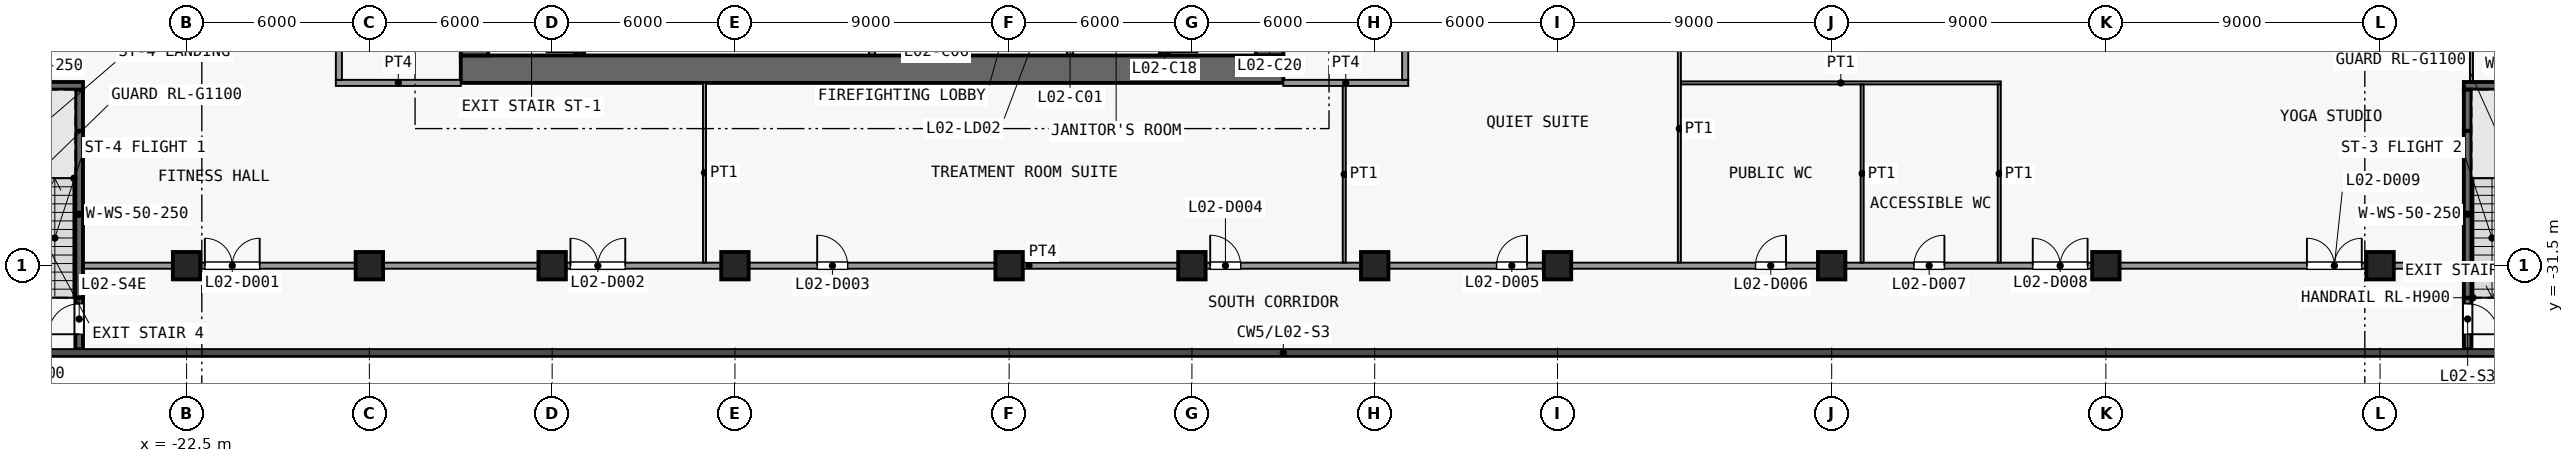
"""IFC4 building model, lengths in metres.
Left out: names, types, materials, properties, quantities, classifications, styles, units other than length and angle.
Written with IfcOpenShell. Run it as: python <this file> out.ifc"""

import sys

from ifc_helpers import new_model, si_unit, direction, frame, frame_2d, origin, origin_2d, place, context, subcontext, project, spatial, rectangle, extrude, element, fill, save


model = new_model("IFC4")
c1 = context("Model", 3, precision=1e-05, world=origin(), true_north=direction((0.0, 1.0)))
c2 = subcontext(c1, "Body", "Model", "MODEL_VIEW")
j1 = project(units=[si_unit("LENGTHUNIT", "METRE"), si_unit("PLANEANGLEUNIT", "RADIAN")], contexts=[c1])
p1 = place(None, origin())
s1 = spatial("IfcSite", under=j1, at=p1, CompositionType="ELEMENT")
p2 = place(p1, origin())
s2 = spatial("IfcBuilding", under=s1, at=p2, CompositionType="ELEMENT")
p3 = place(p2, frame((0.0, 0.0, 13.5)))
s3 = spatial("IfcBuildingStorey", under=s2, at=p3, CompositionType="ELEMENT", Elevation=13.5)
for number, where, z_axis, x_axis in (
    (1, (-22.5, -31.5, 0.0), (0.0, 0.0, 1.0), (1.0, 0.0, 0.0)),
    (2, (-16.5, -31.5, 0.0), (0.0, 0.0, 1.0), (1.0, 0.0, 0.0)),
    (3, (-10.5, -31.5, 0.0), (0.0, 0.0, 1.0), (1.0, 0.0, 0.0)),
    (4, (-4.5, -31.5, 0.0), (0.0, 0.0, 1.0), (1.0, 0.0, 0.0)),
    (5, (4.5, -31.5, 0.0), (0.0, 0.0, 1.0), (1.0, 0.0, 0.0)),
    (6, (10.5, -31.5, 0.0), (0.0, 0.0, 1.0), (1.0, 0.0, 0.0)),
    (7, (16.5, -31.5, 0.0), (0.0, 0.0, 1.0), (1.0, 0.0, 0.0)),
    (8, (22.5, -31.5, 0.0), (0.0, 0.0, 1.0), (1.0, 0.0, 0.0)),
    (9, (31.5, -31.5, 0.0), (0.0, 0.0, 1.0), (1.0, 0.0, 0.0)),
    (10, (40.5, -31.5, 0.0), (0.0, 0.0, 1.0), (1.0, 0.0, 0.0)),
    (11, (49.5, -31.5, 0.0), (0.0, 0.0, 1.0), (1.0, 0.0, 0.0)),
):
    element("IfcColumn", number, at=place(p3, frame(where, z_axis=z_axis, x_axis=x_axis)), inside=s3, PredefinedType="COLUMN", context=c2, shape_type="SweptSolid", body=[
        extrude(rectangle(XDim=0.9, YDim=0.9, at=origin_2d()), origin(), (0.0, 0.0, 1.0), 5.0),
    ])
p4 = place(p3, frame((-13.5, -25.05, 0.0), z_axis=(0.0, 0.0, 1.0), x_axis=(1.0, 0.0, 0.0)))
e12 = element("IfcWall", 12, at=p4, inside=s3, PredefinedType="SHEAR", context=c2, shape_type="SweptSolid", body=[
    extrude(rectangle(XDim=27.0, YDim=0.9, at=frame_2d((13.5, 0.0))), origin(), (0.0, 0.0, 1.0), 4.65),
])
p5 = place(p3, frame((-13.05, -8.5, 0.0), z_axis=(0.0, 0.0, 1.0), x_axis=(0.0, -1.0, 0.0)))
e13 = element("IfcWall", 13, at=p5, inside=s3, PredefinedType="SHEAR", context=c2, shape_type="SweptSolid", body=[
    extrude(rectangle(XDim=16.1, YDim=0.9, at=frame_2d((8.05, 0.0))), origin(), (0.0, 0.0, 1.0), 4.65),
])
p6 = place(p5, frame((14.8, 0.0, 0.0)))
e14 = element("IfcOpeningElement", 14, at=p6, cuts=e13, PredefinedType="OPENING", context=c2, shape_type="SweptSolid", body=[
    extrude(rectangle(XDim=1.1, YDim=2.1, at=frame_2d((0.55, 1.05))), frame((0.0, 0.46, 0.0), z_axis=(0.0, -1.0, 0.0), x_axis=(1.0, 0.0, 0.0)), (0.0, 0.0, 1.0), 0.92),
])
p7 = place(p3, frame((13.05, -24.6, 0.0), z_axis=(0.0, 0.0, 1.0), x_axis=(0.0, 1.0, 0.0)))
e15 = element("IfcWall", 15, at=p7, inside=s3, PredefinedType="SHEAR", context=c2, shape_type="SweptSolid", body=[
    extrude(rectangle(XDim=16.1, YDim=0.9, at=frame_2d((8.05, 0.0))), origin(), (0.0, 0.0, 1.0), 4.65),
])
p8 = place(p7, frame((0.2, 0.0, 0.0)))
e16 = element("IfcOpeningElement", 16, at=p8, cuts=e15, PredefinedType="OPENING", context=c2, shape_type="SweptSolid", body=[
    extrude(rectangle(XDim=1.1, YDim=2.1, at=frame_2d((0.55, 1.05))), frame((0.0, 0.46, 0.0), z_axis=(0.0, -1.0, 0.0), x_axis=(1.0, 0.0, 0.0)), (0.0, 0.0, 1.0), 0.92),
])
p9 = place(p3, frame((-9.6, -24.6, 0.0), z_axis=(0.0, 0.0, 1.0), x_axis=(0.0, 1.0, 0.0)))
e17 = element("IfcWall", 17, at=p9, inside=s3, PredefinedType="SHEAR", context=c2, shape_type="SweptSolid", body=[
    extrude(rectangle(XDim=7.7, YDim=0.3, at=frame_2d((3.85, 0.0))), origin(), (0.0, 0.0, 1.0), 4.65),
])
p10 = place(p9, frame((0.1, 0.0, 0.0)))
e18 = element("IfcOpeningElement", 18, at=p10, cuts=e17, PredefinedType="OPENING", context=c2, shape_type="SweptSolid", body=[
    extrude(rectangle(XDim=1.1, YDim=2.1, at=frame_2d((0.55, 1.05))), frame((0.0, 0.16, 0.0), z_axis=(0.0, -1.0, 0.0), x_axis=(1.0, 0.0, 0.0)), (0.0, 0.0, 1.0), 0.32),
])
p11 = place(p3, frame((0.0, -24.6, 0.0), z_axis=(0.0, 0.0, 1.0), x_axis=(0.0, 1.0, 0.0)))
e19 = element("IfcWall", 19, at=p11, inside=s3, PredefinedType="PARTITIONING", context=c2, shape_type="SweptSolid", body=[
    extrude(rectangle(XDim=2.05, YDim=0.2, at=frame_2d((1.025, 0.0))), origin(), (0.0, 0.0, 1.0), 4.65),
])
p12 = place(p3, frame((3.1, -24.6, 0.0), z_axis=(0.0, 0.0, 1.0), x_axis=(0.0, 1.0, 0.0)))
e20 = element("IfcWall", 20, at=p12, inside=s3, PredefinedType="PARTITIONING", context=c2, shape_type="SweptSolid", body=[
    extrude(rectangle(XDim=2.05, YDim=0.2, at=frame_2d((1.025, 0.0))), origin(), (0.0, 0.0, 1.0), 4.65),
])
p13 = place(p12, frame((0.65, 0.0, 0.0)))
e21 = element("IfcOpeningElement", 21, at=p13, cuts=e20, PredefinedType="OPENING", context=c2, shape_type="SweptSolid", body=[
    extrude(rectangle(XDim=0.9, YDim=2.1, at=frame_2d((0.45, 1.05))), frame((0.0, 0.11, 0.0), z_axis=(0.0, -1.0, 0.0), x_axis=(1.0, 0.0, 0.0)), (0.0, 0.0, 1.0), 0.22),
])
p14 = place(p3, frame((6.5, -22.55, 0.0), z_axis=(0.0, 0.0, 1.0), x_axis=(0.0, -1.0, 0.0)))
e22 = element("IfcWall", 22, at=p14, inside=s3, PredefinedType="PARTITIONING", context=c2, shape_type="SweptSolid", body=[
    extrude(rectangle(XDim=2.05, YDim=0.2, at=frame_2d((1.025, 0.0))), origin(), (0.0, 0.0, 1.0), 4.65),
])
p15 = place(p14, frame((0.35, 0.0, 0.0)))
e23 = element("IfcOpeningElement", 23, at=p15, cuts=e22, PredefinedType="OPENING", context=c2, shape_type="SweptSolid", body=[
    extrude(rectangle(XDim=1.2, YDim=2.1, at=frame_2d((0.6, 1.05))), frame((0.0, 0.11, 0.0), z_axis=(0.0, -1.0, 0.0), x_axis=(1.0, 0.0, 0.0)), (0.0, 0.0, 1.0), 0.22),
])
p16 = place(p3, frame((9.6, -16.9, 0.0), z_axis=(0.0, 0.0, 1.0), x_axis=(0.0, -1.0, 0.0)))
e24 = element("IfcWall", 24, at=p16, inside=s3, PredefinedType="SHEAR", context=c2, shape_type="SweptSolid", body=[
    extrude(rectangle(XDim=7.7, YDim=0.3, at=frame_2d((3.85, 0.0))), origin(), (0.0, 0.0, 1.0), 4.65),
])
p17 = place(p16, frame((6.5, 0.0, 0.0)))
e25 = element("IfcOpeningElement", 25, at=p17, cuts=e24, PredefinedType="OPENING", context=c2, shape_type="SweptSolid", body=[
    extrude(rectangle(XDim=1.1, YDim=2.1, at=frame_2d((0.55, 1.05))), frame((0.0, 0.16, 0.0), z_axis=(0.0, -1.0, 0.0), x_axis=(1.0, 0.0, 0.0)), (0.0, 0.0, 1.0), 0.32),
])
p18 = place(p3, frame((52.375, -32.55, 0.0), z_axis=(0.0, 0.0, 1.0), x_axis=(0.0, -1.0, 0.0)))
e26 = element("IfcWall", 26, at=p18, inside=s3, PredefinedType="SHEAR", context=c2, shape_type="SweptSolid", body=[
    extrude(rectangle(XDim=1.69, YDim=0.25, at=frame_2d((0.845, 0.0))), origin(), (0.0, 0.0, 1.0), 4.65),
])
p19 = place(p18, frame((0.2, 0.0, 0.0)))
e27 = element("IfcOpeningElement", 27, at=p19, cuts=e26, PredefinedType="OPENING", context=c2, shape_type="SweptSolid", body=[
    extrude(rectangle(XDim=1.0, YDim=2.1, at=frame_2d((0.5, 1.05))), frame((0.0, 0.135, 0.0), z_axis=(0.0, -1.0, 0.0), x_axis=(1.0, 0.0, 0.0)), (0.0, 0.0, 1.0), 0.27),
])
p20 = place(p3, frame((52.375, -32.55, 0.0), z_axis=(0.0, 0.0, 1.0), x_axis=(0.0, 1.0, 0.0)))
e28 = element("IfcWall", 28, at=p20, inside=s3, PredefinedType="SHEAR", context=c2, shape_type="SweptSolid", body=[
    extrude(rectangle(XDim=5.48, YDim=0.25, at=frame_2d((2.74, 0.0))), origin(), (0.0, 0.0, 1.0), 4.65),
])
p21 = place(p3, frame((52.375, -27.07, 0.0), z_axis=(0.0, 0.0, 1.0), x_axis=(0.0, 1.0, 0.0)))
e29 = element("IfcWall", 29, at=p21, inside=s3, PredefinedType="SHEAR", context=c2, shape_type="SweptSolid", body=[
    extrude(rectangle(XDim=1.35, YDim=0.25, at=frame_2d((0.675, 0.0))), origin(), (0.0, 0.0, 1.0), 4.65),
])
p22 = place(p3, frame((52.25, -25.595, 0.0), z_axis=(0.0, 0.0, 1.0), x_axis=(1.0, 0.0, 0.0)))
e30 = element("IfcWall", 30, at=p22, inside=s3, PredefinedType="SHEAR", context=c2, shape_type="SweptSolid", body=[
    extrude(rectangle(XDim=3.35, YDim=0.25, at=frame_2d((1.675, 0.0))), origin(), (0.0, 0.0, 1.0), 4.65),
])
p23 = place(p3, frame((-26.025, -34.24, 0.0), z_axis=(0.0, 0.0, 1.0), x_axis=(0.0, 1.0, 0.0)))
e31 = element("IfcWall", 31, at=p23, inside=s3, PredefinedType="SHEAR", context=c2, shape_type="SweptSolid", body=[
    extrude(rectangle(XDim=1.69, YDim=0.25, at=frame_2d((0.845, 0.0))), origin(), (0.0, 0.0, 1.0), 4.65),
])
p24 = place(p23, frame((0.49, 0.0, 0.0)))
e32 = element("IfcOpeningElement", 32, at=p24, cuts=e31, PredefinedType="OPENING", context=c2, shape_type="SweptSolid", body=[
    extrude(rectangle(XDim=1.0, YDim=2.1, at=frame_2d((0.5, 1.05))), frame((0.0, 0.135, 0.0), z_axis=(0.0, -1.0, 0.0), x_axis=(1.0, 0.0, 0.0)), (0.0, 0.0, 1.0), 0.27),
])
p25 = place(p3, frame((-26.025, -32.55, 0.0), z_axis=(0.0, 0.0, 1.0), x_axis=(0.0, 1.0, 0.0)))
e33 = element("IfcWall", 33, at=p25, inside=s3, PredefinedType="SHEAR", context=c2, shape_type="SweptSolid", body=[
    extrude(rectangle(XDim=5.48, YDim=0.25, at=frame_2d((2.74, 0.0))), origin(), (0.0, 0.0, 1.0), 4.65),
])
p26 = place(p3, frame((-26.025, -27.07, 0.0), z_axis=(0.0, 0.0, 1.0), x_axis=(0.0, 1.0, 0.0)))
e34 = element("IfcWall", 34, at=p26, inside=s3, PredefinedType="SHEAR", context=c2, shape_type="SweptSolid", body=[
    extrude(rectangle(XDim=1.35, YDim=0.25, at=frame_2d((0.675, 0.0))), origin(), (0.0, 0.0, 1.0), 4.65),
])
p27 = place(p3, frame((-29.25, -25.595, 0.0), z_axis=(0.0, 0.0, 1.0), x_axis=(1.0, 0.0, 0.0)))
e35 = element("IfcWall", 35, at=p27, inside=s3, PredefinedType="SHEAR", context=c2, shape_type="SweptSolid", body=[
    extrude(rectangle(XDim=3.35, YDim=0.25, at=frame_2d((1.675, 0.0))), origin(), (0.0, 0.0, 1.0), 4.65),
])
p28 = place(p3, frame((-25.9, -31.5, 0.0), z_axis=(0.0, 0.0, 1.0), x_axis=(1.0, 0.0, 0.0)))
e36 = element("IfcWall", 36, at=p28, inside=s3, PredefinedType="PARTITIONING", context=c2, shape_type="SweptSolid", body=[
    extrude(rectangle(XDim=78.15, YDim=0.2, at=frame_2d((39.075, 0.0))), origin(), (0.0, 0.0, 1.0), 4.65),
])
p29 = place(p28, frame((4.0, 0.0, 0.0)))
e37 = element("IfcOpeningElement", 37, at=p29, cuts=e36, PredefinedType="OPENING", context=c2, shape_type="SweptSolid", body=[
    extrude(rectangle(XDim=1.8, YDim=2.1, at=frame_2d((0.9, 1.05))), frame((0.0, 0.11, 0.0), z_axis=(0.0, -1.0, 0.0), x_axis=(1.0, 0.0, 0.0)), (0.0, 0.0, 1.0), 0.22),
])
p30 = place(p28, frame((16.0, 0.0, 0.0)))
e38 = element("IfcOpeningElement", 38, at=p30, cuts=e36, PredefinedType="OPENING", context=c2, shape_type="SweptSolid", body=[
    extrude(rectangle(XDim=1.8, YDim=2.1, at=frame_2d((0.9, 1.05))), frame((0.0, 0.11, 0.0), z_axis=(0.0, -1.0, 0.0), x_axis=(1.0, 0.0, 0.0)), (0.0, 0.0, 1.0), 0.22),
])
p31 = place(p28, frame((24.1, 0.0, 0.0)))
e39 = element("IfcOpeningElement", 39, at=p31, cuts=e36, PredefinedType="OPENING", context=c2, shape_type="SweptSolid", body=[
    extrude(rectangle(XDim=1.0, YDim=2.1, at=frame_2d((0.5, 1.05))), frame((0.0, 0.11, 0.0), z_axis=(0.0, -1.0, 0.0), x_axis=(1.0, 0.0, 0.0)), (0.0, 0.0, 1.0), 0.22),
])
p32 = place(p28, frame((37.0, 0.0, 0.0)))
e40 = element("IfcOpeningElement", 40, at=p32, cuts=e36, PredefinedType="OPENING", context=c2, shape_type="SweptSolid", body=[
    extrude(rectangle(XDim=1.0, YDim=2.1, at=frame_2d((0.5, 1.05))), frame((0.0, 0.11, 0.0), z_axis=(0.0, -1.0, 0.0), x_axis=(1.0, 0.0, 0.0)), (0.0, 0.0, 1.0), 0.22),
])
p33 = place(p28, frame((46.4, 0.0, 0.0)))
e41 = element("IfcOpeningElement", 41, at=p33, cuts=e36, PredefinedType="OPENING", context=c2, shape_type="SweptSolid", body=[
    extrude(rectangle(XDim=1.0, YDim=2.1, at=frame_2d((0.5, 1.05))), frame((0.0, 0.11, 0.0), z_axis=(0.0, -1.0, 0.0), x_axis=(1.0, 0.0, 0.0)), (0.0, 0.0, 1.0), 0.22),
])
p34 = place(p28, frame((54.9, 0.0, 0.0)))
e42 = element("IfcOpeningElement", 42, at=p34, cuts=e36, PredefinedType="OPENING", context=c2, shape_type="SweptSolid", body=[
    extrude(rectangle(XDim=1.0, YDim=2.1, at=frame_2d((0.5, 1.05))), frame((0.0, 0.11, 0.0), z_axis=(0.0, -1.0, 0.0), x_axis=(1.0, 0.0, 0.0)), (0.0, 0.0, 1.0), 0.22),
])
p35 = place(p28, frame((60.1, 0.0, 0.0)))
e43 = element("IfcOpeningElement", 43, at=p35, cuts=e36, PredefinedType="OPENING", context=c2, shape_type="SweptSolid", body=[
    extrude(rectangle(XDim=1.0, YDim=2.1, at=frame_2d((0.5, 1.05))), frame((0.0, 0.11, 0.0), z_axis=(0.0, -1.0, 0.0), x_axis=(1.0, 0.0, 0.0)), (0.0, 0.0, 1.0), 0.22),
])
p36 = place(p28, frame((64.0, 0.0, 0.0)))
e44 = element("IfcOpeningElement", 44, at=p36, cuts=e36, PredefinedType="OPENING", context=c2, shape_type="SweptSolid", body=[
    extrude(rectangle(XDim=1.8, YDim=2.1, at=frame_2d((0.9, 1.05))), frame((0.0, 0.11, 0.0), z_axis=(0.0, -1.0, 0.0), x_axis=(1.0, 0.0, 0.0)), (0.0, 0.0, 1.0), 0.22),
])
p37 = place(p28, frame((73.0, 0.0, 0.0)))
e45 = element("IfcOpeningElement", 45, at=p37, cuts=e36, PredefinedType="OPENING", context=c2, shape_type="SweptSolid", body=[
    extrude(rectangle(XDim=1.8, YDim=2.1, at=frame_2d((0.9, 1.05))), frame((0.0, 0.11, 0.0), z_axis=(0.0, -1.0, 0.0), x_axis=(1.0, 0.0, 0.0)), (0.0, 0.0, 1.0), 0.22),
])
for number, where, z_axis, x_axis in (
    (46, (-17.6, -25.5, 0.0), (0.0, 0.0, 1.0), (1.0, 0.0, 0.0)),
    (47, (13.5, -25.5, 0.0), (0.0, 0.0, 1.0), (1.0, 0.0, 0.0)),
):
    element("IfcWall", number, at=place(p3, frame(where, z_axis=z_axis, x_axis=x_axis)), inside=s3, PredefinedType="PARTITIONING", context=c2, shape_type="SweptSolid", body=[
        extrude(rectangle(XDim=4.1, YDim=0.2, at=frame_2d((2.05, 0.0))), origin(), (0.0, 0.0, 1.0), 4.65),
    ])
p38 = place(p3, frame((26.55, -25.5, 0.0), z_axis=(0.0, 0.0, 1.0), x_axis=(1.0, 0.0, 0.0)))
e48 = element("IfcWall", 48, at=p38, inside=s3, PredefinedType="PARTITIONING", context=c2, shape_type="SweptSolid", body=[
    extrude(rectangle(XDim=10.5, YDim=0.1, at=frame_2d((5.25, 0.0))), origin(), (0.0, 0.0, 1.0), 4.65),
])
p39 = place(p3, frame((-17.5, -25.4, 0.0), z_axis=(0.0, 0.0, 1.0), x_axis=(0.0, 1.0, 0.0)))
e49 = element("IfcWall", 49, at=p39, inside=s3, PredefinedType="PARTITIONING", context=c2, shape_type="SweptSolid", body=[
    extrude(rectangle(XDim=2.8, YDim=0.2, at=frame_2d((1.4, 0.0))), origin(), (0.0, 0.0, 1.0), 4.65),
])
p40 = place(p3, frame((-5.5, -31.4, 0.0), z_axis=(0.0, 0.0, 1.0), x_axis=(0.0, 1.0, 0.0)))
e50 = element("IfcWall", 50, at=p40, inside=s3, PredefinedType="PARTITIONING", context=c2, shape_type="SweptSolid", body=[
    extrude(rectangle(XDim=5.9, YDim=0.1, at=frame_2d((2.95, 0.0))), origin(), (0.0, 0.0, 1.0), 4.65),
])
p41 = place(p3, frame((15.5, -31.4, 0.0), z_axis=(0.0, 0.0, 1.0), x_axis=(0.0, 1.0, 0.0)))
e51 = element("IfcWall", 51, at=p41, inside=s3, PredefinedType="PARTITIONING", context=c2, shape_type="SweptSolid", body=[
    extrude(rectangle(XDim=5.8, YDim=0.1, at=frame_2d((2.9, 0.0))), origin(), (0.0, 0.0, 1.0), 4.65),
])
p42 = place(p3, frame((17.5, -25.4, 0.0), z_axis=(0.0, 0.0, 1.0), x_axis=(0.0, 1.0, 0.0)))
e52 = element("IfcWall", 52, at=p42, inside=s3, PredefinedType="PARTITIONING", context=c2, shape_type="SweptSolid", body=[
    extrude(rectangle(XDim=2.8, YDim=0.2, at=frame_2d((1.4, 0.0))), origin(), (0.0, 0.0, 1.0), 4.65),
])
p43 = place(p3, frame((26.5, -31.4, 0.0), z_axis=(0.0, 0.0, 1.0), x_axis=(0.0, 1.0, 0.0)))
e53 = element("IfcWall", 53, at=p43, inside=s3, PredefinedType="PARTITIONING", context=c2, shape_type="SweptSolid", body=[
    extrude(rectangle(XDim=8.8, YDim=0.1, at=frame_2d((4.4, 0.0))), origin(), (0.0, 0.0, 1.0), 4.65),
])
for number, where, z_axis, x_axis in (
    (54, (32.5, -31.4, 0.0), (0.0, 0.0, 1.0), (0.0, 1.0, 0.0)),
    (55, (37.0, -31.4, 0.0), (0.0, 0.0, 1.0), (0.0, 1.0, 0.0)),
):
    element("IfcWall", number, at=place(p3, frame(where, z_axis=z_axis, x_axis=x_axis)), inside=s3, PredefinedType="PARTITIONING", context=c2, shape_type="SweptSolid", body=[
        extrude(rectangle(XDim=5.85, YDim=0.1, at=frame_2d((2.925, 0.0))), origin(), (0.0, 0.0, 1.0), 4.65),
    ])
p44 = place(p3, frame((52.5, -25.47, 0.0), z_axis=(0.0, 0.0, 1.0), x_axis=(0.0, 1.0, 0.0)))
e56 = element("IfcWall", 56, at=p44, inside=s3, PredefinedType="PARTITIONING", context=c2, shape_type="SweptSolid", body=[
    extrude(rectangle(XDim=8.97, YDim=0.1, at=frame_2d((4.485, 0.0))), origin(), (0.0, 0.0, 1.0), 4.65),
])
p45 = place(p19, origin())
e57 = element("IfcDoor", 57, at=p45, inside=s3, OperationType="SINGLE_SWING_RIGHT", PredefinedType="DOOR", context=c2, shape_type="SweptSolid", body=[
    extrude(rectangle(XDim=1.0, YDim=2.1, at=frame_2d((0.5, 1.05))), frame((0.0, 0.025, 0.0), z_axis=(0.0, -1.0, 0.0), x_axis=(1.0, 0.0, 0.0)), (0.0, 0.0, 1.0), 0.05),
])
fill(e27, e57)
p46 = place(p24, origin())
e58 = element("IfcDoor", 58, at=p46, inside=s3, OperationType="SINGLE_SWING_LEFT", PredefinedType="DOOR", context=c2, shape_type="SweptSolid", body=[
    extrude(rectangle(XDim=1.0, YDim=2.1, at=frame_2d((0.5, 1.05))), frame((0.0, 0.025, 0.0), z_axis=(0.0, -1.0, 0.0), x_axis=(1.0, 0.0, 0.0)), (0.0, 0.0, 1.0), 0.05),
])
fill(e32, e58)
p47 = place(p29, origin())
e59 = element("IfcDoor", 59, at=p47, inside=s3, OperationType="DOUBLE_DOOR_SINGLE_SWING", PredefinedType="DOOR", context=c2, shape_type="SweptSolid", body=[
    extrude(rectangle(XDim=1.8, YDim=2.1, at=frame_2d((0.9, 1.05))), frame((0.0, 0.025, 0.0), z_axis=(0.0, -1.0, 0.0), x_axis=(1.0, 0.0, 0.0)), (0.0, 0.0, 1.0), 0.05),
])
fill(e37, e59)
p48 = place(p30, origin())
e60 = element("IfcDoor", 60, at=p48, inside=s3, OperationType="DOUBLE_DOOR_SINGLE_SWING", PredefinedType="DOOR", context=c2, shape_type="SweptSolid", body=[
    extrude(rectangle(XDim=1.8, YDim=2.1, at=frame_2d((0.9, 1.05))), frame((0.0, 0.025, 0.0), z_axis=(0.0, -1.0, 0.0), x_axis=(1.0, 0.0, 0.0)), (0.0, 0.0, 1.0), 0.05),
])
fill(e38, e60)
p49 = place(p31, origin())
e61 = element("IfcDoor", 61, at=p49, inside=s3, OperationType="SINGLE_SWING_RIGHT", PredefinedType="DOOR", context=c2, shape_type="SweptSolid", body=[
    extrude(rectangle(XDim=1.0, YDim=2.1, at=frame_2d((0.5, 1.05))), frame((0.0, 0.025, 0.0), z_axis=(0.0, -1.0, 0.0), x_axis=(1.0, 0.0, 0.0)), (0.0, 0.0, 1.0), 0.05),
])
fill(e39, e61)
p50 = place(p32, origin())
e62 = element("IfcDoor", 62, at=p50, inside=s3, OperationType="SINGLE_SWING_RIGHT", PredefinedType="DOOR", context=c2, shape_type="SweptSolid", body=[
    extrude(rectangle(XDim=1.0, YDim=2.1, at=frame_2d((0.5, 1.05))), frame((0.0, 0.025, 0.0), z_axis=(0.0, -1.0, 0.0), x_axis=(1.0, 0.0, 0.0)), (0.0, 0.0, 1.0), 0.05),
])
fill(e40, e62)
p51 = place(p33, origin())
e63 = element("IfcDoor", 63, at=p51, inside=s3, OperationType="SINGLE_SWING_LEFT", PredefinedType="DOOR", context=c2, shape_type="SweptSolid", body=[
    extrude(rectangle(XDim=1.0, YDim=2.1, at=frame_2d((0.5, 1.05))), frame((0.0, 0.025, 0.0), z_axis=(0.0, -1.0, 0.0), x_axis=(1.0, 0.0, 0.0)), (0.0, 0.0, 1.0), 0.05),
])
fill(e41, e63)
p52 = place(p34, origin())
e64 = element("IfcDoor", 64, at=p52, inside=s3, OperationType="SINGLE_SWING_LEFT", PredefinedType="DOOR", context=c2, shape_type="SweptSolid", body=[
    extrude(rectangle(XDim=1.0, YDim=2.1, at=frame_2d((0.5, 1.05))), frame((0.0, 0.025, 0.0), z_axis=(0.0, -1.0, 0.0), x_axis=(1.0, 0.0, 0.0)), (0.0, 0.0, 1.0), 0.05),
])
fill(e42, e64)
p53 = place(p35, origin())
e65 = element("IfcDoor", 65, at=p53, inside=s3, OperationType="SINGLE_SWING_LEFT", PredefinedType="DOOR", context=c2, shape_type="SweptSolid", body=[
    extrude(rectangle(XDim=1.0, YDim=2.1, at=frame_2d((0.5, 1.05))), frame((0.0, 0.025, 0.0), z_axis=(0.0, -1.0, 0.0), x_axis=(1.0, 0.0, 0.0)), (0.0, 0.0, 1.0), 0.05),
])
fill(e43, e65)
p54 = place(p36, origin())
e66 = element("IfcDoor", 66, at=p54, inside=s3, OperationType="DOUBLE_DOOR_SINGLE_SWING", PredefinedType="DOOR", context=c2, shape_type="SweptSolid", body=[
    extrude(rectangle(XDim=1.8, YDim=2.1, at=frame_2d((0.9, 1.05))), frame((0.0, 0.025, 0.0), z_axis=(0.0, -1.0, 0.0), x_axis=(1.0, 0.0, 0.0)), (0.0, 0.0, 1.0), 0.05),
])
fill(e44, e66)
p55 = place(p37, origin())
e67 = element("IfcDoor", 67, at=p55, inside=s3, OperationType="DOUBLE_DOOR_SINGLE_SWING", PredefinedType="DOOR", context=c2, shape_type="SweptSolid", body=[
    extrude(rectangle(XDim=1.8, YDim=2.1, at=frame_2d((0.9, 1.05))), frame((0.0, 0.025, 0.0), z_axis=(0.0, -1.0, 0.0), x_axis=(1.0, 0.0, 0.0)), (0.0, 0.0, 1.0), 0.05),
])
fill(e45, e67)
save(model, sys.argv[1])
